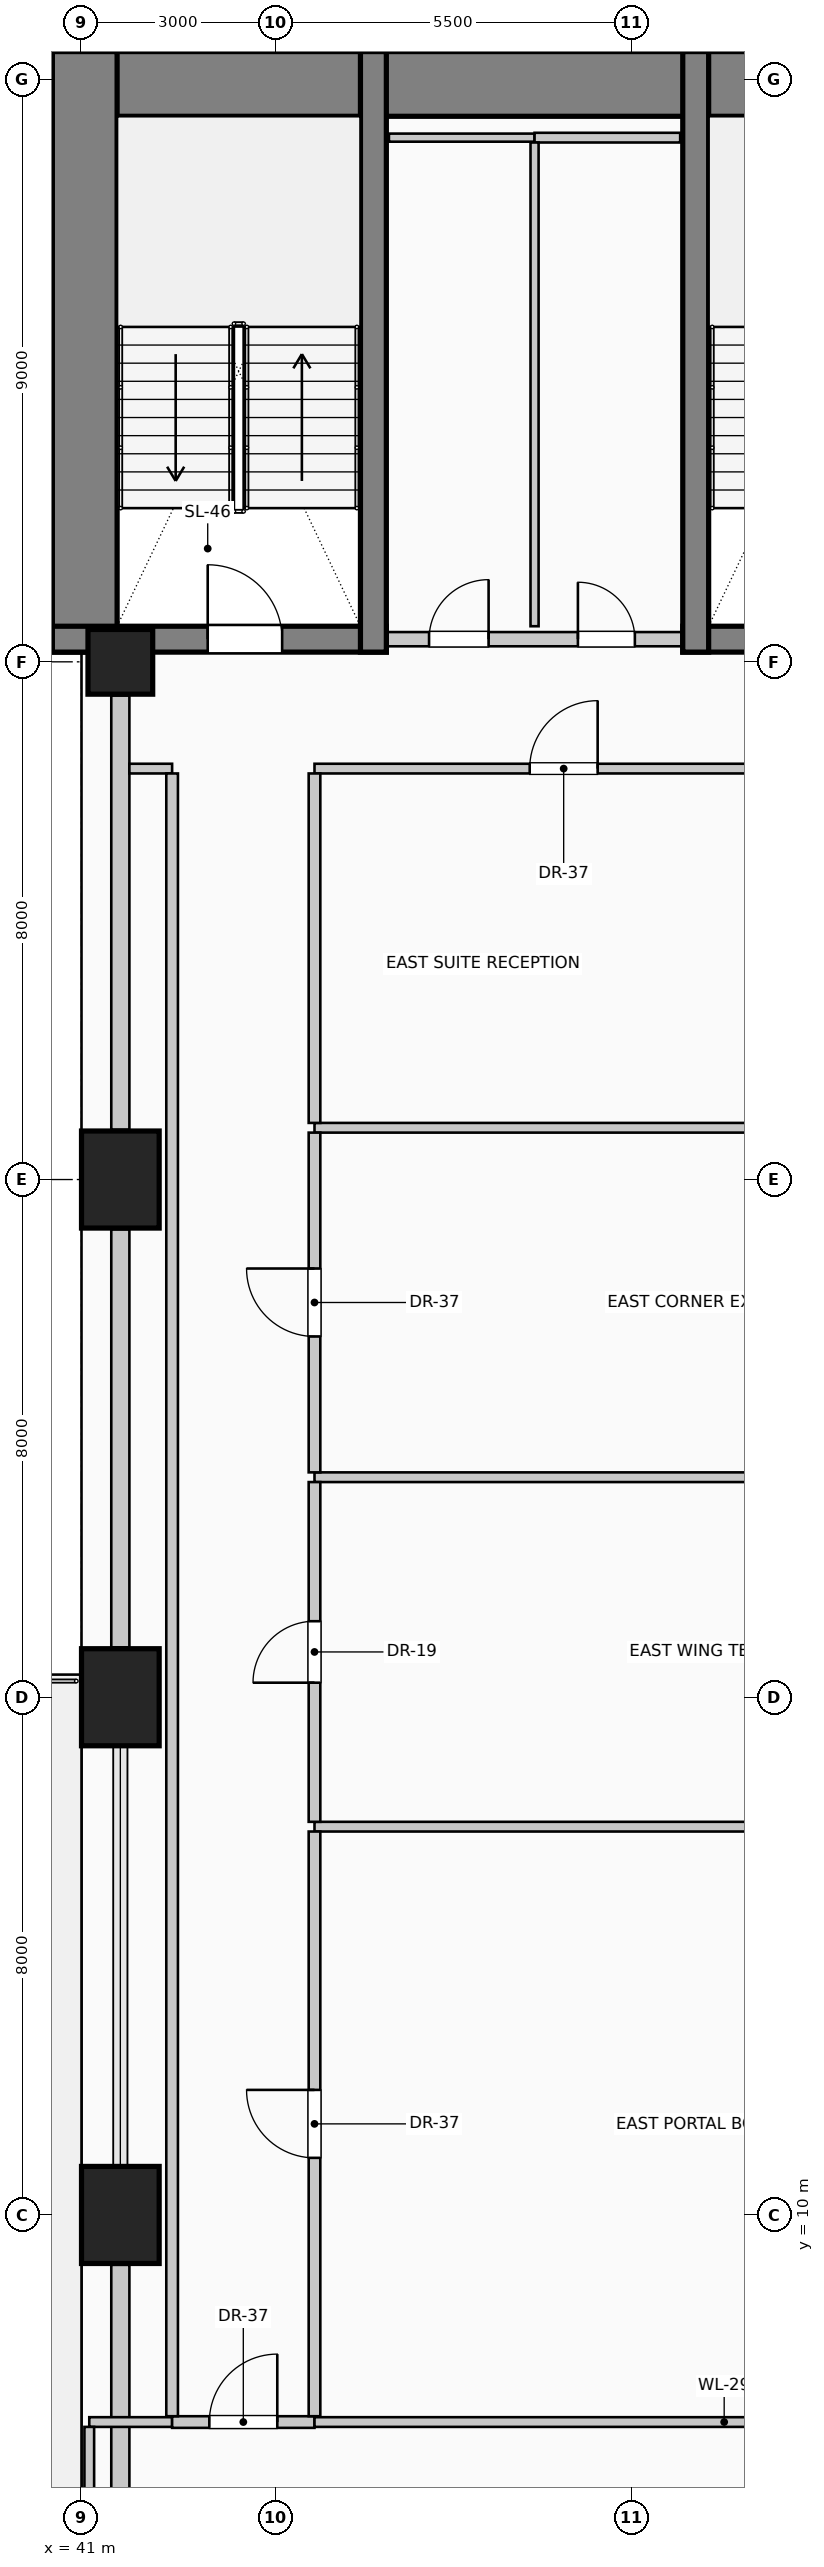
"""IFC4 building model, lengths in metres.
Left out: names, types, materials, properties, quantities, classifications, styles, units other than length and angle.
Written with IfcOpenShell. Run it as: python <this file> out.ifc"""

import sys

from ifc_helpers import new_model, si_unit, direction, frame, frame_2d, origin, origin_2d, place, context, subcontext, project, spatial, rectangle, circle, extrude, element, fill, save


model = new_model("IFC4")
c1 = context("Model", 3, precision=1e-05, world=origin(), true_north=direction((0.0, 1.0)))
c2 = subcontext(c1, "Body", "Model", "MODEL_VIEW")
j1 = project(units=[si_unit("LENGTHUNIT", "METRE"), si_unit("PLANEANGLEUNIT", "RADIAN")], contexts=[c1])
p1 = place(None, origin())
s1 = spatial("IfcSite", under=j1, at=p1, CompositionType="ELEMENT")
p2 = place(p1, origin())
s2 = spatial("IfcBuilding", under=s1, at=p2, CompositionType="ELEMENT")
p3 = place(p2, frame((0.0, 0.0, 22.6)))
s3 = spatial("IfcBuildingStorey", under=s2, at=p3, CompositionType="ELEMENT", Elevation=22.6)
p4 = place(p3, frame((40.55, 42.93, 0.0), z_axis=(0.0, 0.0, 1.0), x_axis=(1.0, 0.0, 0.0)))
e1 = element("IfcWall", 1, at=p4, inside=s3, PredefinedType="SHEAR", context=c2, shape_type="SweptSolid", body=[
    extrude(rectangle(XDim=14.9, YDim=1.0, at=frame_2d((7.45, 0.0))), origin(), (0.0, 0.0, 1.0), 4.0),
])
p5 = place(p3, frame((41.05, 34.15, 0.0), z_axis=(0.0, 0.0, 1.0), x_axis=(0.0, 1.0, 0.0)))
e2 = element("IfcWall", 2, at=p5, inside=s3, PredefinedType="SHEAR", context=c2, shape_type="SweptSolid", body=[
    extrude(rectangle(XDim=9.28, YDim=1.0, at=frame_2d((4.64, 0.0))), origin(), (0.0, 0.0, 1.0), 4.0),
])
p6 = place(p3, frame((40.55, 34.35, 0.0), z_axis=(0.0, 0.0, 1.0), x_axis=(1.0, 0.0, 0.0)))
e3 = element("IfcWall", 3, at=p6, inside=s3, PredefinedType="SHEAR", context=c2, shape_type="SweptSolid", body=[
    extrude(rectangle(XDim=5.16, YDim=0.4, at=frame_2d((2.58, 0.0))), origin(), (0.0, 0.0, 1.0), 4.0),
])
p7 = place(p6, frame((2.4, 0.0, 0.0)))
e4 = element("IfcOpeningElement", 4, at=p7, cuts=e3, PredefinedType="OPENING", context=c2, shape_type="SweptSolid", body=[
    extrude(rectangle(XDim=1.15, YDim=2.2, at=frame_2d((0.575, 1.1))), frame((0.0, 0.21, 0.0), z_axis=(0.0, -1.0, 0.0), x_axis=(1.0, 0.0, 0.0)), (0.0, 0.0, 1.0), 0.42),
])
p8 = place(p3, frame((45.51, 34.15, 0.0), z_axis=(0.0, 0.0, 1.0), x_axis=(0.0, 1.0, 0.0)))
e5 = element("IfcWall", 5, at=p8, inside=s3, PredefinedType="SHEAR", context=c2, shape_type="SweptSolid", body=[
    extrude(rectangle(XDim=9.28, YDim=0.4, at=frame_2d((4.64, 0.0))), origin(), (0.0, 0.0, 1.0), 4.0),
])
p9 = place(p3, frame((50.29, 34.35, 0.0), z_axis=(0.0, 0.0, 1.0), x_axis=(1.0, 0.0, 0.0)))
e6 = element("IfcWall", 6, at=p9, inside=s3, PredefinedType="SHEAR", context=c2, shape_type="SweptSolid", body=[
    extrude(rectangle(XDim=5.16, YDim=0.4, at=frame_2d((2.58, 0.0))), origin(), (0.0, 0.0, 1.0), 4.0),
])
p10 = place(p9, frame((1.4, 0.0, 0.0)))
e7 = element("IfcOpeningElement", 7, at=p10, cuts=e6, PredefinedType="OPENING", context=c2, shape_type="SweptSolid", body=[
    extrude(rectangle(XDim=1.15, YDim=2.2, at=frame_2d((0.575, 1.1))), frame((0.0, 0.21, 0.0), z_axis=(0.0, -1.0, 0.0), x_axis=(1.0, 0.0, 0.0)), (0.0, 0.0, 1.0), 0.42),
])
p11 = place(p3, frame((50.49, 34.15, 0.0), z_axis=(0.0, 0.0, 1.0), x_axis=(0.0, 1.0, 0.0)))
e8 = element("IfcWall", 8, at=p11, inside=s3, PredefinedType="SHEAR", context=c2, shape_type="SweptSolid", body=[
    extrude(rectangle(XDim=9.28, YDim=0.4, at=frame_2d((4.64, 0.0))), origin(), (0.0, 0.0, 1.0), 4.0),
])
for number, where, z_axis, x_axis in (
    (9, (41.6, 10.0, 0.0), (0.0, 0.0, 1.0), (1.0, 0.0, 0.0)),
    (10, (41.6, 18.0, 0.0), (0.0, 0.0, 1.0), (1.0, 0.0, 0.0)),
    (11, (41.6, 26.0, 0.0), (0.0, 0.0, 1.0), (1.0, 0.0, 0.0)),
):
    element("IfcColumn", number, at=place(p3, frame(where, z_axis=z_axis, x_axis=x_axis)), inside=s3, PredefinedType="COLUMN", context=c2, shape_type="SweptSolid", body=[
        extrude(rectangle(XDim=1.2, YDim=1.5, at=origin_2d()), origin(), (0.0, 0.0, 1.0), 4.0),
    ])
p12 = place(p3, frame((41.6, 34.0, 0.0), z_axis=(0.0, 0.0, 1.0), x_axis=(1.0, 0.0, 0.0)))
e12 = element("IfcColumn", 12, at=p12, inside=s3, PredefinedType="COLUMN", context=c2, shape_type="SweptSolid", body=[
    extrude(circle(Radius=0.5, at=origin_2d()), origin(), (0.0, 0.0, 1.0), 4.0),
])
p13 = place(p3, frame((41.6, 1.37, 0.0), z_axis=(0.0, 0.0, 1.0), x_axis=(0.0, 1.0, 0.0)))
e13 = element("IfcWall", 13, at=p13, inside=s3, PredefinedType="SOLIDWALL", context=c2, shape_type="SweptSolid", body=[
    extrude(rectangle(XDim=7.86, YDim=0.28, at=frame_2d((3.93, 0.0))), origin(), (0.0, 0.0, 1.0), 3.0),
])
p14 = place(p13, frame((1.153, 0.0, 0.42)))
e14 = element("IfcOpeningElement", 14, at=p14, cuts=e13, PredefinedType="OPENING", context=c2, shape_type="SweptSolid", body=[
    extrude(rectangle(XDim=2.2, YDim=1.95, at=frame_2d((1.1, 0.975))), frame((0.0, 0.15, 0.0), z_axis=(0.0, -1.0, 0.0), x_axis=(1.0, 0.0, 0.0)), (0.0, 0.0, 1.0), 0.3),
])
p15 = place(p3, frame((41.6, 18.77, 0.0), z_axis=(0.0, 0.0, 1.0), x_axis=(0.0, 1.0, 0.0)))
e15 = element("IfcWall", 15, at=p15, inside=s3, PredefinedType="SOLIDWALL", context=c2, shape_type="SweptSolid", body=[
    extrude(rectangle(XDim=6.46, YDim=0.28, at=frame_2d((3.23, 0.0))), origin(), (0.0, 0.0, 1.0), 3.0),
])
p16 = place(p3, frame((41.6, 26.77, 0.0), z_axis=(0.0, 0.0, 1.0), x_axis=(0.0, 1.0, 0.0)))
e16 = element("IfcWall", 16, at=p16, inside=s3, PredefinedType="SOLIDWALL", context=c2, shape_type="SweptSolid", body=[
    extrude(rectangle(XDim=6.71, YDim=0.28, at=frame_2d((3.355, 0.0))), origin(), (0.0, 0.0, 1.0), 3.0),
])
p17 = place(p3, frame((45.72, 34.35, 0.0), z_axis=(0.0, 0.0, 1.0), x_axis=(1.0, 0.0, 0.0)))
e17 = element("IfcWall", 17, at=p17, inside=s3, PredefinedType="PARTITIONING", context=c2, shape_type="SweptSolid", body=[
    extrude(rectangle(XDim=4.56, YDim=0.22, at=frame_2d((2.28, 0.0))), origin(), (0.0, 0.0, 1.0), 3.7),
])
p18 = place(p17, frame((0.65, 0.0, 0.0)))
e18 = element("IfcOpeningElement", 18, at=p18, cuts=e17, PredefinedType="OPENING", context=c2, shape_type="SweptSolid", body=[
    extrude(rectangle(XDim=0.92, YDim=2.1, at=frame_2d((0.46, 1.05))), frame((0.0, 0.12, 0.0), z_axis=(0.0, -1.0, 0.0), x_axis=(1.0, 0.0, 0.0)), (0.0, 0.0, 1.0), 0.24),
])
p19 = place(p17, frame((2.95, 0.0, 0.0)))
e19 = element("IfcOpeningElement", 19, at=p19, cuts=e17, PredefinedType="OPENING", context=c2, shape_type="SweptSolid", body=[
    extrude(rectangle(XDim=0.88, YDim=2.1, at=frame_2d((0.44, 1.05))), frame((0.0, 0.12, 0.0), z_axis=(0.0, -1.0, 0.0), x_axis=(1.0, 0.0, 0.0)), (0.0, 0.0, 1.0), 0.24),
])
p20 = place(p3, frame((41.12, 6.8, 0.0), z_axis=(0.0, 0.0, 1.0), x_axis=(1.0, 0.0, 0.0)))
e20 = element("IfcWall", 20, at=p20, inside=s3, PredefinedType="PARTITIONING", context=c2, shape_type="SweptSolid", body=[
    extrude(rectangle(XDim=1.28, YDim=0.15, at=frame_2d((0.64, 0.0))), origin(), (0.0, 0.0, 1.0), 3.095),
])
p21 = place(p3, frame((42.4, 6.8, 0.0), z_axis=(0.0, 0.0, 1.0), x_axis=(1.0, 0.0, 0.0)))
e21 = element("IfcWall", 21, at=p21, inside=s3, PredefinedType="PARTITIONING", context=c2, shape_type="SweptSolid", body=[
    extrude(rectangle(XDim=2.2, YDim=0.18, at=frame_2d((1.1, 0.0))), origin(), (0.0, 0.0, 1.0), 3.095),
])
p22 = place(p21, frame((0.575, 0.0, 0.0)))
e22 = element("IfcOpeningElement", 22, at=p22, cuts=e21, PredefinedType="OPENING", context=c2, shape_type="SweptSolid", body=[
    extrude(rectangle(XDim=1.05, YDim=2.15, at=frame_2d((0.525, 1.075))), frame((0.0, 0.1, 0.0), z_axis=(0.0, -1.0, 0.0), x_axis=(1.0, 0.0, 0.0)), (0.0, 0.0, 1.0), 0.2),
])
p23 = place(p3, frame((44.6, 6.8, 0.0), z_axis=(0.0, 0.0, 1.0), x_axis=(1.0, 0.0, 0.0)))
e23 = element("IfcWall", 23, at=p23, inside=s3, PredefinedType="PARTITIONING", context=c2, shape_type="SweptSolid", body=[
    extrude(rectangle(XDim=12.66, YDim=0.15, at=frame_2d((6.33, 0.0))), origin(), (0.0, 0.0, 1.0), 3.095),
])
for number, where, z_axis, x_axis in (
    (24, (44.6, 16.0, 0.0), (0.0, 0.0, 1.0), (1.0, 0.0, 0.0)),
    (25, (44.6, 21.4, 0.0), (0.0, 0.0, 1.0), (1.0, 0.0, 0.0)),
):
    element("IfcWall", number, at=place(p3, frame(where, z_axis=z_axis, x_axis=x_axis)), inside=s3, PredefinedType="PARTITIONING", context=c2, shape_type="SweptSolid", body=[
        extrude(rectangle(XDim=12.66, YDim=0.15, at=frame_2d((6.33, 0.0))), origin(), (0.0, 0.0, 1.0), 3.7),
    ])
p24 = place(p3, frame((44.6, 26.8, 0.0), z_axis=(0.0, 0.0, 1.0), x_axis=(1.0, 0.0, 0.0)))
e26 = element("IfcWall", 26, at=p24, inside=s3, PredefinedType="PARTITIONING", context=c2, shape_type="SweptSolid", body=[
    extrude(rectangle(XDim=7.7, YDim=0.15, at=frame_2d((3.85, 0.0))), origin(), (0.0, 0.0, 1.0), 3.7),
])
p25 = place(p3, frame((41.74, 32.35, 0.0), z_axis=(0.0, 0.0, 1.0), x_axis=(1.0, 0.0, 0.0)))
e27 = element("IfcWall", 27, at=p25, inside=s3, PredefinedType="PARTITIONING", context=c2, shape_type="SweptSolid", body=[
    extrude(rectangle(XDim=0.66, YDim=0.15, at=frame_2d((0.33, 0.0))), origin(), (0.0, 0.0, 1.0), 3.7),
])
p26 = place(p3, frame((44.6, 32.35, 0.0), z_axis=(0.0, 0.0, 1.0), x_axis=(1.0, 0.0, 0.0)))
e28 = element("IfcWall", 28, at=p26, inside=s3, PredefinedType="PARTITIONING", context=c2, shape_type="SweptSolid", body=[
    extrude(rectangle(XDim=7.7, YDim=0.15, at=frame_2d((3.85, 0.0))), origin(), (0.0, 0.0, 1.0), 3.7),
])
p27 = place(p26, frame((3.325, 0.0, 0.0)))
e29 = element("IfcOpeningElement", 29, at=p27, cuts=e28, PredefinedType="OPENING", context=c2, shape_type="SweptSolid", body=[
    extrude(rectangle(XDim=1.05, YDim=2.15, at=frame_2d((0.525, 1.075))), frame((0.0, 0.085, 0.0), z_axis=(0.0, -1.0, 0.0), x_axis=(1.0, 0.0, 0.0)), (0.0, 0.0, 1.0), 0.17),
])
p28 = place(p3, frame((45.75, 42.1, 0.0), z_axis=(0.0, 0.0, 1.0), x_axis=(1.0, 0.0, 0.0)))
e30 = element("IfcWall", 30, at=p28, inside=s3, PredefinedType="PARTITIONING", context=c2, shape_type="SweptSolid", body=[
    extrude(rectangle(XDim=2.25, YDim=0.125, at=frame_2d((1.125, 0.0))), origin(), (0.0, 0.0, 1.0), 3.7),
])
p29 = place(p3, frame((48.0, 42.1, 0.0), z_axis=(0.0, 0.0, 1.0), x_axis=(1.0, 0.0, 0.0)))
e31 = element("IfcWall", 31, at=p29, inside=s3, PredefinedType="PARTITIONING", context=c2, shape_type="SweptSolid", body=[
    extrude(rectangle(XDim=2.25, YDim=0.15, at=frame_2d((1.125, 0.0))), origin(), (0.0, 0.0, 1.0), 3.7),
])
p30 = place(p3, frame((41.12, 1.35, 0.0), z_axis=(0.0, 0.0, 1.0), x_axis=(0.0, 1.0, 0.0)))
e32 = element("IfcWall", 32, at=p30, inside=s3, PredefinedType="PARTITIONING", context=c2, shape_type="SweptSolid", body=[
    extrude(rectangle(XDim=5.375, YDim=0.15, at=frame_2d((2.688, 0.0))), origin(), (0.0, 0.0, 1.0), 3.7),
])
p31 = place(p3, frame((42.4, 6.89, 0.0), z_axis=(0.0, 0.0, 1.0), x_axis=(0.0, 1.0, 0.0)))
e33 = element("IfcWall", 33, at=p31, inside=s3, PredefinedType="PARTITIONING", context=c2, shape_type="SweptSolid", body=[
    extrude(rectangle(XDim=25.385, YDim=0.18, at=frame_2d((12.692, 0.0))), origin(), (0.0, 0.0, 1.0), 3.7),
])
p32 = place(p3, frame((44.6, 6.89, 0.0), z_axis=(0.0, 0.0, 1.0), x_axis=(0.0, 1.0, 0.0)))
e34 = element("IfcWall", 34, at=p32, inside=s3, PredefinedType="PARTITIONING", context=c2, shape_type="SweptSolid", body=[
    extrude(rectangle(XDim=9.035, YDim=0.18, at=frame_2d((4.518, 0.0))), origin(), (0.0, 0.0, 1.0), 3.7),
])
p33 = place(p32, frame((3.992, 0.0, 0.0)))
e35 = element("IfcOpeningElement", 35, at=p33, cuts=e34, PredefinedType="OPENING", context=c2, shape_type="SweptSolid", body=[
    extrude(rectangle(XDim=1.05, YDim=2.15, at=frame_2d((0.525, 1.075))), frame((0.0, 0.1, 0.0), z_axis=(0.0, -1.0, 0.0), x_axis=(1.0, 0.0, 0.0)), (0.0, 0.0, 1.0), 0.2),
])
p34 = place(p3, frame((44.6, 16.075, 0.0), z_axis=(0.0, 0.0, 1.0), x_axis=(0.0, 1.0, 0.0)))
e36 = element("IfcWall", 36, at=p34, inside=s3, PredefinedType="PARTITIONING", context=c2, shape_type="SweptSolid", body=[
    extrude(rectangle(XDim=5.25, YDim=0.18, at=frame_2d((2.625, 0.0))), origin(), (0.0, 0.0, 1.0), 3.7),
])
p35 = place(p34, frame((2.15, 0.0, 0.0)))
e37 = element("IfcOpeningElement", 37, at=p35, cuts=e36, PredefinedType="OPENING", context=c2, shape_type="SweptSolid", body=[
    extrude(rectangle(XDim=0.95, YDim=2.15, at=frame_2d((0.475, 1.075))), frame((0.0, 0.1, 0.0), z_axis=(0.0, -1.0, 0.0), x_axis=(1.0, 0.0, 0.0)), (0.0, 0.0, 1.0), 0.2),
])
p36 = place(p3, frame((44.6, 21.475, 0.0), z_axis=(0.0, 0.0, 1.0), x_axis=(0.0, 1.0, 0.0)))
e38 = element("IfcWall", 38, at=p36, inside=s3, PredefinedType="PARTITIONING", context=c2, shape_type="SweptSolid", body=[
    extrude(rectangle(XDim=5.25, YDim=0.18, at=frame_2d((2.625, 0.0))), origin(), (0.0, 0.0, 1.0), 3.7),
])
p37 = place(p36, frame((2.1, 0.0, 0.0)))
e39 = element("IfcOpeningElement", 39, at=p37, cuts=e38, PredefinedType="OPENING", context=c2, shape_type="SweptSolid", body=[
    extrude(rectangle(XDim=1.05, YDim=2.15, at=frame_2d((0.525, 1.075))), frame((0.0, 0.1, 0.0), z_axis=(0.0, -1.0, 0.0), x_axis=(1.0, 0.0, 0.0)), (0.0, 0.0, 1.0), 0.2),
])
p38 = place(p3, frame((44.6, 26.875, 0.0), z_axis=(0.0, 0.0, 1.0), x_axis=(0.0, 1.0, 0.0)))
e40 = element("IfcWall", 40, at=p38, inside=s3, PredefinedType="PARTITIONING", context=c2, shape_type="SweptSolid", body=[
    extrude(rectangle(XDim=5.4, YDim=0.18, at=frame_2d((2.7, 0.0))), origin(), (0.0, 0.0, 1.0), 3.7),
])
p39 = place(p3, frame((48.0, 34.55, 0.0), z_axis=(0.0, 0.0, 1.0), x_axis=(0.0, 1.0, 0.0)))
e41 = element("IfcWall", 41, at=p39, inside=s3, PredefinedType="PARTITIONING", context=c2, shape_type="SweptSolid", body=[
    extrude(rectangle(XDim=7.475, YDim=0.125, at=frame_2d((3.737, 0.0))), origin(), (0.0, 0.0, 1.0), 3.7),
])
p40 = place(p7, origin())
e42 = element("IfcDoor", 42, at=p40, inside=s3, OperationType="SINGLE_SWING_LEFT", PredefinedType="DOOR", context=c2, shape_type="SweptSolid", body=[
    extrude(rectangle(XDim=1.15, YDim=2.2, at=frame_2d((0.575, 1.1))), frame((0.0, 0.025, 0.0), z_axis=(0.0, -1.0, 0.0), x_axis=(1.0, 0.0, 0.0)), (0.0, 0.0, 1.0), 0.05),
])
fill(e4, e42)
p41 = place(p18, origin())
e43 = element("IfcDoor", 43, at=p41, inside=s3, OperationType="SINGLE_SWING_RIGHT", PredefinedType="DOOR", context=c2, shape_type="SweptSolid", body=[
    extrude(rectangle(XDim=0.92, YDim=2.1, at=frame_2d((0.46, 1.05))), frame((0.0, 0.025, 0.0), z_axis=(0.0, -1.0, 0.0), x_axis=(1.0, 0.0, 0.0)), (0.0, 0.0, 1.0), 0.05),
])
fill(e18, e43)
p42 = place(p19, origin())
e44 = element("IfcDoor", 44, at=p42, inside=s3, OperationType="SINGLE_SWING_LEFT", PredefinedType="DOOR", context=c2, shape_type="SweptSolid", body=[
    extrude(rectangle(XDim=0.88, YDim=2.1, at=frame_2d((0.44, 1.05))), frame((0.0, 0.025, 0.0), z_axis=(0.0, -1.0, 0.0), x_axis=(1.0, 0.0, 0.0)), (0.0, 0.0, 1.0), 0.05),
])
fill(e19, e44)
p43 = place(p22, origin())
e45 = element("IfcDoor", 45, at=p43, inside=s3, OperationType="SINGLE_SWING_RIGHT", PredefinedType="DOOR", context=c2, shape_type="SweptSolid", body=[
    extrude(rectangle(XDim=1.05, YDim=2.15, at=frame_2d((0.525, 1.075))), frame((0.0, 0.025, 0.0), z_axis=(0.0, -1.0, 0.0), x_axis=(1.0, 0.0, 0.0)), (0.0, 0.0, 1.0), 0.05),
])
fill(e22, e45)
p44 = place(p27, origin())
e46 = element("IfcDoor", 46, at=p44, inside=s3, OperationType="SINGLE_SWING_RIGHT", PredefinedType="DOOR", context=c2, shape_type="SweptSolid", body=[
    extrude(rectangle(XDim=1.05, YDim=2.15, at=frame_2d((0.525, 1.075))), frame((0.0, 0.025, 0.0), z_axis=(0.0, -1.0, 0.0), x_axis=(1.0, 0.0, 0.0)), (0.0, 0.0, 1.0), 0.05),
])
fill(e29, e46)
p45 = place(p33, origin())
e47 = element("IfcDoor", 47, at=p45, inside=s3, OperationType="SINGLE_SWING_RIGHT", PredefinedType="DOOR", context=c2, shape_type="SweptSolid", body=[
    extrude(rectangle(XDim=1.05, YDim=2.15, at=frame_2d((0.525, 1.075))), frame((0.0, 0.025, 0.0), z_axis=(0.0, -1.0, 0.0), x_axis=(1.0, 0.0, 0.0)), (0.0, 0.0, 1.0), 0.05),
])
fill(e35, e47)
p46 = place(p35, origin())
e48 = element("IfcDoor", 48, at=p46, inside=s3, OperationType="SINGLE_SWING_LEFT", PredefinedType="DOOR", context=c2, shape_type="SweptSolid", body=[
    extrude(rectangle(XDim=0.95, YDim=2.15, at=frame_2d((0.475, 1.075))), frame((0.0, 0.025, 0.0), z_axis=(0.0, -1.0, 0.0), x_axis=(1.0, 0.0, 0.0)), (0.0, 0.0, 1.0), 0.05),
])
fill(e37, e48)
p47 = place(p37, origin())
e49 = element("IfcDoor", 49, at=p47, inside=s3, OperationType="SINGLE_SWING_RIGHT", PredefinedType="DOOR", context=c2, shape_type="SweptSolid", body=[
    extrude(rectangle(XDim=1.05, YDim=2.15, at=frame_2d((0.525, 1.075))), frame((0.0, 0.025, 0.0), z_axis=(0.0, -1.0, 0.0), x_axis=(1.0, 0.0, 0.0)), (0.0, 0.0, 1.0), 0.05),
])
fill(e39, e49)
save(model, sys.argv[1])
